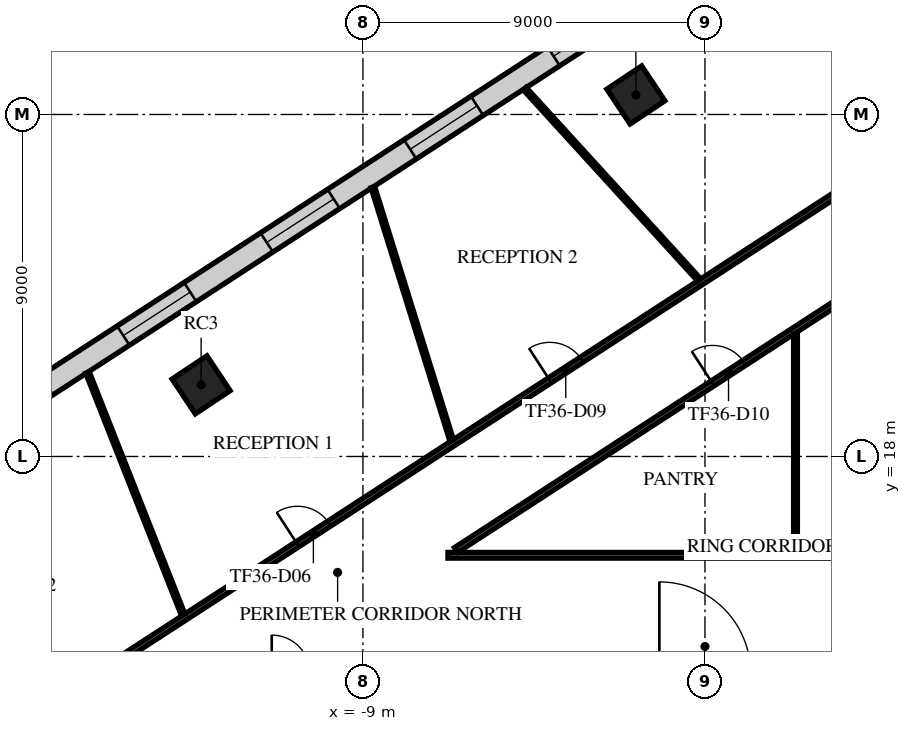
"""IFC4 building model, lengths in metres.
Left out: names, types, materials, properties, quantities, classifications, styles, units other than length and angle.
Written with IfcOpenShell. Run it as: python <this file> out.ifc"""

import sys

from ifc_helpers import new_model, si_unit, direction, frame, frame_2d, origin, origin_2d, place, context, subcontext, project, spatial, rectangle, extrude, element, fill, save


model = new_model("IFC4")
c1 = context("Model", 3, precision=1e-05, world=origin(), true_north=direction((0.0, 1.0)))
c2 = subcontext(c1, "Body", "Model", "MODEL_VIEW")
j1 = project(units=[si_unit("LENGTHUNIT", "METRE"), si_unit("PLANEANGLEUNIT", "RADIAN")], contexts=[c1])
p1 = place(None, origin())
s1 = spatial("IfcSite", under=j1, at=p1, CompositionType="ELEMENT")
p2 = place(p1, origin())
s2 = spatial("IfcBuilding", under=s1, at=p2, CompositionType="ELEMENT")
p3 = place(p2, frame((0.0, 0.0, 155.7)))
s3 = spatial("IfcBuildingStorey", under=s2, at=p3, CompositionType="ELEMENT", Elevation=155.7)
for number, where, z_axis, x_axis in (
    (1, (-1.818, 27.513, 0.0), (0.0, 0.0, 1.0), (0.832, 0.555, 0.0)),
    (2, (-13.258, 19.885, 0.0), (0.0, 0.0, 1.0), (0.832, 0.555, 0.0)),
):
    element("IfcColumn", number, at=place(p3, frame(where, z_axis=z_axis, x_axis=x_axis)), inside=s3, PredefinedType="COLUMN", context=c2, shape_type="SweptSolid", body=[
        extrude(rectangle(XDim=1.1, YDim=1.1, at=origin_2d()), origin(), (0.0, 0.0, 1.0), 4.0),
    ])
p4 = place(p3, frame((6.333, 35.233, 0.0), z_axis=(0.0, 0.0, 1.0), x_axis=(-0.83867264201, -0.544635841222, 0.0)))
e3 = element("IfcWall", 3, at=p4, inside=s3, PredefinedType="STANDARD", context=c2, shape_type="SweptSolid", body=[
    extrude(rectangle(XDim=49.376, YDim=0.6, at=frame_2d((24.688, 0.0))), origin(), (0.0, 0.0, 1.0), 3.6),
])
p5 = place(p4, frame((1.2, 0.0, 0.9)))
e4 = element("IfcOpeningElement", 4, at=p5, cuts=e3, PredefinedType="OPENING", context=c2, shape_type="SweptSolid", body=[
    extrude(rectangle(XDim=2.1, YDim=2.1, at=frame_2d((1.05, 1.05))), frame((0.0, 0.31, 0.0), z_axis=(0.0, -1.0, 0.0), x_axis=(1.0, 0.0, 0.0)), (0.0, 0.0, 1.0), 0.62),
])
p6 = place(p4, frame((5.7, 0.0, 0.9)))
e5 = element("IfcOpeningElement", 5, at=p6, cuts=e3, PredefinedType="OPENING", context=c2, shape_type="SweptSolid", body=[
    extrude(rectangle(XDim=2.1, YDim=2.1, at=frame_2d((1.05, 1.05))), frame((0.0, 0.31, 0.0), z_axis=(0.0, -1.0, 0.0), x_axis=(1.0, 0.0, 0.0)), (0.0, 0.0, 1.0), 0.62),
])
p7 = place(p4, frame((10.2, 0.0, 0.9)))
e6 = element("IfcOpeningElement", 6, at=p7, cuts=e3, PredefinedType="OPENING", context=c2, shape_type="SweptSolid", body=[
    extrude(rectangle(XDim=2.1, YDim=2.1, at=frame_2d((1.05, 1.05))), frame((0.0, 0.31, 0.0), z_axis=(0.0, -1.0, 0.0), x_axis=(1.0, 0.0, 0.0)), (0.0, 0.0, 1.0), 0.62),
])
p8 = place(p4, frame((14.7, 0.0, 0.9)))
e7 = element("IfcOpeningElement", 7, at=p8, cuts=e3, PredefinedType="OPENING", context=c2, shape_type="SweptSolid", body=[
    extrude(rectangle(XDim=2.1, YDim=2.1, at=frame_2d((1.05, 1.05))), frame((0.0, 0.31, 0.0), z_axis=(0.0, -1.0, 0.0), x_axis=(1.0, 0.0, 0.0)), (0.0, 0.0, 1.0), 0.62),
])
p9 = place(p4, frame((19.2, 0.0, 0.9)))
e8 = element("IfcOpeningElement", 8, at=p9, cuts=e3, PredefinedType="OPENING", context=c2, shape_type="SweptSolid", body=[
    extrude(rectangle(XDim=2.1, YDim=2.1, at=frame_2d((1.05, 1.05))), frame((0.0, 0.31, 0.0), z_axis=(0.0, -1.0, 0.0), x_axis=(1.0, 0.0, 0.0)), (0.0, 0.0, 1.0), 0.62),
])
p10 = place(p4, frame((23.7, 0.0, 0.9)))
e9 = element("IfcOpeningElement", 9, at=p10, cuts=e3, PredefinedType="OPENING", context=c2, shape_type="SweptSolid", body=[
    extrude(rectangle(XDim=2.1, YDim=2.1, at=frame_2d((1.05, 1.05))), frame((0.0, 0.31, 0.0), z_axis=(0.0, -1.0, 0.0), x_axis=(1.0, 0.0, 0.0)), (0.0, 0.0, 1.0), 0.62),
])
p11 = place(p4, frame((28.2, 0.0, 0.9)))
e10 = element("IfcOpeningElement", 10, at=p11, cuts=e3, PredefinedType="OPENING", context=c2, shape_type="SweptSolid", body=[
    extrude(rectangle(XDim=2.1, YDim=2.1, at=frame_2d((1.05, 1.05))), frame((0.0, 0.31, 0.0), z_axis=(0.0, -1.0, 0.0), x_axis=(1.0, 0.0, 0.0)), (0.0, 0.0, 1.0), 0.62),
])
p12 = place(p4, frame((32.7, 0.0, 0.9)))
e11 = element("IfcOpeningElement", 11, at=p12, cuts=e3, PredefinedType="OPENING", context=c2, shape_type="SweptSolid", body=[
    extrude(rectangle(XDim=2.1, YDim=2.1, at=frame_2d((1.05, 1.05))), frame((0.0, 0.31, 0.0), z_axis=(0.0, -1.0, 0.0), x_axis=(1.0, 0.0, 0.0)), (0.0, 0.0, 1.0), 0.62),
])
p13 = place(p4, frame((37.2, 0.0, 0.9)))
e12 = element("IfcOpeningElement", 12, at=p13, cuts=e3, PredefinedType="OPENING", context=c2, shape_type="SweptSolid", body=[
    extrude(rectangle(XDim=2.1, YDim=2.1, at=frame_2d((1.05, 1.05))), frame((0.0, 0.31, 0.0), z_axis=(0.0, -1.0, 0.0), x_axis=(1.0, 0.0, 0.0)), (0.0, 0.0, 1.0), 0.62),
])
p14 = place(p4, frame((41.7, 0.0, 0.9)))
e13 = element("IfcOpeningElement", 13, at=p14, cuts=e3, PredefinedType="OPENING", context=c2, shape_type="SweptSolid", body=[
    extrude(rectangle(XDim=2.1, YDim=2.1, at=frame_2d((1.05, 1.05))), frame((0.0, 0.31, 0.0), z_axis=(0.0, -1.0, 0.0), x_axis=(1.0, 0.0, 0.0)), (0.0, 0.0, 1.0), 0.62),
])
p15 = place(p4, frame((46.138, 0.0, 0.9)))
e14 = element("IfcOpeningElement", 14, at=p15, cuts=e3, PredefinedType="OPENING", context=c2, shape_type="SweptSolid", body=[
    extrude(rectangle(XDim=2.1, YDim=2.1, at=frame_2d((1.05, 1.05))), frame((0.0, 0.31, 0.0), z_axis=(0.0, -1.0, 0.0), x_axis=(1.0, 0.0, 0.0)), (0.0, 0.0, 1.0), 0.62),
])
p16 = place(p3, frame((-25.134, 6.331, 0.0), z_axis=(0.0, 0.0, 1.0), x_axis=(0.838655992286, 0.544661478904, 0.0)))
e15 = element("IfcWall", 15, at=p16, inside=s3, PredefinedType="PARTITIONING", context=c2, shape_type="SweptSolid", body=[
    extrude(rectangle(XDim=35.262, YDim=0.15, at=frame_2d((17.631, 0.0))), origin(), (0.0, 0.0, 1.0), 3.15),
])
p17 = place(p16, frame((0.55, 0.0, 0.0)))
e16 = element("IfcOpeningElement", 16, at=p17, cuts=e15, PredefinedType="OPENING", context=c2, shape_type="SweptSolid", body=[
    extrude(rectangle(XDim=1.0, YDim=2.1, at=frame_2d((0.5, 1.05))), frame((0.0, 0.085, 0.0), z_axis=(0.0, -1.0, 0.0), x_axis=(1.0, 0.0, 0.0)), (0.0, 0.0, 1.0), 0.17),
])
p18 = place(p16, frame((5.989, 0.0, 0.0)))
e17 = element("IfcOpeningElement", 17, at=p18, cuts=e15, PredefinedType="OPENING", context=c2, shape_type="SweptSolid", body=[
    extrude(rectangle(XDim=1.0, YDim=2.1, at=frame_2d((0.5, 1.05))), frame((0.0, 0.085, 0.0), z_axis=(0.0, -1.0, 0.0), x_axis=(1.0, 0.0, 0.0)), (0.0, 0.0, 1.0), 0.17),
])
p19 = place(p16, frame((17.183, 0.0, 0.0)))
e18 = element("IfcOpeningElement", 18, at=p19, cuts=e15, PredefinedType="OPENING", context=c2, shape_type="SweptSolid", body=[
    extrude(rectangle(XDim=1.0, YDim=2.1, at=frame_2d((0.5, 1.05))), frame((0.0, 0.085, 0.0), z_axis=(0.0, -1.0, 0.0), x_axis=(1.0, 0.0, 0.0)), (0.0, 0.0, 1.0), 0.17),
])
p20 = place(p16, frame((25.102, 0.0, 0.0)))
e19 = element("IfcOpeningElement", 19, at=p20, cuts=e15, PredefinedType="OPENING", context=c2, shape_type="SweptSolid", body=[
    extrude(rectangle(XDim=1.0, YDim=2.1, at=frame_2d((0.5, 1.05))), frame((0.0, 0.085, 0.0), z_axis=(0.0, -1.0, 0.0), x_axis=(1.0, 0.0, 0.0)), (0.0, 0.0, 1.0), 0.17),
])
p21 = place(p3, frame((-6.763, 15.4, 0.0), z_axis=(0.0, 0.0, 1.0), x_axis=(1.0, 0.0, 0.0)))
e20 = element("IfcWall", 20, at=p21, inside=s3, PredefinedType="PARTITIONING", context=c2, shape_type="SweptSolid", body=[
    extrude(rectangle(XDim=19.654, YDim=0.15, at=frame_2d((9.827, 0.0))), origin(), (0.0, 0.0, 1.0), 3.15),
])
p22 = place(p21, frame((14.445, 0.0, 0.0)))
e21 = element("IfcOpeningElement", 21, at=p22, cuts=e20, PredefinedType="OPENING", context=c2, shape_type="SweptSolid", body=[
    extrude(rectangle(XDim=1.8, YDim=2.1, at=frame_2d((0.9, 1.05))), frame((0.0, 0.085, 0.0), z_axis=(0.0, -1.0, 0.0), x_axis=(1.0, 0.0, 0.0)), (0.0, 0.0, 1.0), 0.17),
])
p23 = place(p3, frame((-6.551, 15.538, 0.0), z_axis=(0.0, 0.0, 1.0), x_axis=(0.838658107211, 0.544658222383, 0.0)))
e22 = element("IfcWall", 22, at=p23, inside=s3, PredefinedType="PARTITIONING", context=c2, shape_type="SweptSolid", body=[
    extrude(rectangle(XDim=14.663, YDim=0.15, at=frame_2d((7.331, 0.0))), origin(), (0.0, 0.0, 1.0), 3.15),
])
p24 = place(p23, frame((8.05, 0.0, 0.0)))
e23 = element("IfcOpeningElement", 23, at=p24, cuts=e22, PredefinedType="OPENING", context=c2, shape_type="SweptSolid", body=[
    extrude(rectangle(XDim=1.0, YDim=2.1, at=frame_2d((0.5, 1.05))), frame((0.0, 0.085, 0.0), z_axis=(0.0, -1.0, 0.0), x_axis=(1.0, 0.0, 0.0)), (0.0, 0.0, 1.0), 0.17),
])
p25 = place(p3, frame((-16.247, 20.209, 0.0), z_axis=(0.0, 0.0, 1.0), x_axis=(0.367220899636, -0.930133759666, 0.0)))
e24 = element("IfcWall", 24, at=p25, inside=s3, PredefinedType="PARTITIONING", context=c2, shape_type="SweptSolid", body=[
    extrude(rectangle(XDim=6.85, YDim=0.1, at=frame_2d((3.425, 0.0))), origin(), (0.0, 0.0, 1.0), 2.9),
])
p26 = place(p3, frame((-8.738, 25.086, 0.0), z_axis=(0.0, 0.0, 1.0), x_axis=(0.297094226599, -0.954848166214, 0.0)))
e25 = element("IfcWall", 25, at=p26, inside=s3, PredefinedType="PARTITIONING", context=c2, shape_type="SweptSolid", body=[
    extrude(rectangle(XDim=6.971, YDim=0.1, at=frame_2d((3.485, 0.0))), origin(), (0.0, 0.0, 1.0), 2.9),
])
p27 = place(p3, frame((-4.744, 27.68, 0.0), z_axis=(0.0, 0.0, 1.0), x_axis=(0.673918024529, -0.738806128977, 0.0)))
e26 = element("IfcWall", 26, at=p27, inside=s3, PredefinedType="PARTITIONING", context=c2, shape_type="SweptSolid", body=[
    extrude(rectangle(XDim=6.806, YDim=0.1, at=frame_2d((3.403, 0.0))), origin(), (0.0, 0.0, 1.0), 2.9),
])
p28 = place(p3, frame((2.382, 15.475, 0.0), z_axis=(0.0, 0.0, 1.0), x_axis=(0.0, 1.0, 0.0)))
e27 = element("IfcWall", 27, at=p28, inside=s3, PredefinedType="PARTITIONING", context=c2, shape_type="SweptSolid", body=[
    extrude(rectangle(XDim=5.742, YDim=0.1, at=frame_2d((2.871, 0.0))), origin(), (0.0, 0.0, 1.0), 3.15),
])
p29 = place(p7, origin())
e28 = element("IfcWindow", 28, at=p29, inside=s3, PartitioningType="SINGLE_PANEL", PredefinedType="WINDOW", context=c2, shape_type="SweptSolid", body=[
    extrude(rectangle(XDim=2.1, YDim=2.1, at=frame_2d((1.05, 1.05))), frame((0.0, 0.03, 0.0), z_axis=(0.0, -1.0, 0.0), x_axis=(1.0, 0.0, 0.0)), (0.0, 0.0, 1.0), 0.06),
])
fill(e6, e28)
p30 = place(p8, origin())
e29 = element("IfcWindow", 29, at=p30, inside=s3, PartitioningType="SINGLE_PANEL", PredefinedType="WINDOW", context=c2, shape_type="SweptSolid", body=[
    extrude(rectangle(XDim=2.1, YDim=2.1, at=frame_2d((1.05, 1.05))), frame((0.0, 0.03, 0.0), z_axis=(0.0, -1.0, 0.0), x_axis=(1.0, 0.0, 0.0)), (0.0, 0.0, 1.0), 0.06),
])
fill(e7, e29)
p31 = place(p9, origin())
e30 = element("IfcWindow", 30, at=p31, inside=s3, PartitioningType="SINGLE_PANEL", PredefinedType="WINDOW", context=c2, shape_type="SweptSolid", body=[
    extrude(rectangle(XDim=2.1, YDim=2.1, at=frame_2d((1.05, 1.05))), frame((0.0, 0.03, 0.0), z_axis=(0.0, -1.0, 0.0), x_axis=(1.0, 0.0, 0.0)), (0.0, 0.0, 1.0), 0.06),
])
fill(e8, e30)
p32 = place(p10, origin())
e31 = element("IfcWindow", 31, at=p32, inside=s3, PartitioningType="SINGLE_PANEL", PredefinedType="WINDOW", context=c2, shape_type="SweptSolid", body=[
    extrude(rectangle(XDim=2.1, YDim=2.1, at=frame_2d((1.05, 1.05))), frame((0.0, 0.03, 0.0), z_axis=(0.0, -1.0, 0.0), x_axis=(1.0, 0.0, 0.0)), (0.0, 0.0, 1.0), 0.06),
])
fill(e9, e31)
p33 = place(p19, origin())
e32 = element("IfcDoor", 32, at=p33, inside=s3, OperationType="SINGLE_SWING_RIGHT", PredefinedType="DOOR", context=c2, shape_type="SweptSolid", body=[
    extrude(rectangle(XDim=1.0, YDim=2.1, at=frame_2d((0.5, 1.05))), frame((0.0, 0.025, 0.0), z_axis=(0.0, -1.0, 0.0), x_axis=(1.0, 0.0, 0.0)), (0.0, 0.0, 1.0), 0.05),
])
fill(e18, e32)
p34 = place(p20, origin())
e33 = element("IfcDoor", 33, at=p34, inside=s3, OperationType="SINGLE_SWING_LEFT", PredefinedType="DOOR", context=c2, shape_type="SweptSolid", body=[
    extrude(rectangle(XDim=1.0, YDim=2.1, at=frame_2d((0.5, 1.05))), frame((0.0, 0.025, 0.0), z_axis=(0.0, -1.0, 0.0), x_axis=(1.0, 0.0, 0.0)), (0.0, 0.0, 1.0), 0.05),
])
fill(e19, e33)
p35 = place(p24, frame((1.0, 0.0, 0.0), z_axis=(0.0, 0.0, 1.0), x_axis=(-1.0, 0.0, 0.0)))
e34 = element("IfcDoor", 34, at=p35, inside=s3, OperationType="SINGLE_SWING_RIGHT", PredefinedType="DOOR", context=c2, shape_type="SweptSolid", body=[
    extrude(rectangle(XDim=1.0, YDim=2.1, at=frame_2d((0.5, 1.05))), frame((0.0, 0.025, 0.0), z_axis=(0.0, -1.0, 0.0), x_axis=(1.0, 0.0, 0.0)), (0.0, 0.0, 1.0), 0.05),
])
fill(e23, e34)
save(model, sys.argv[1])
